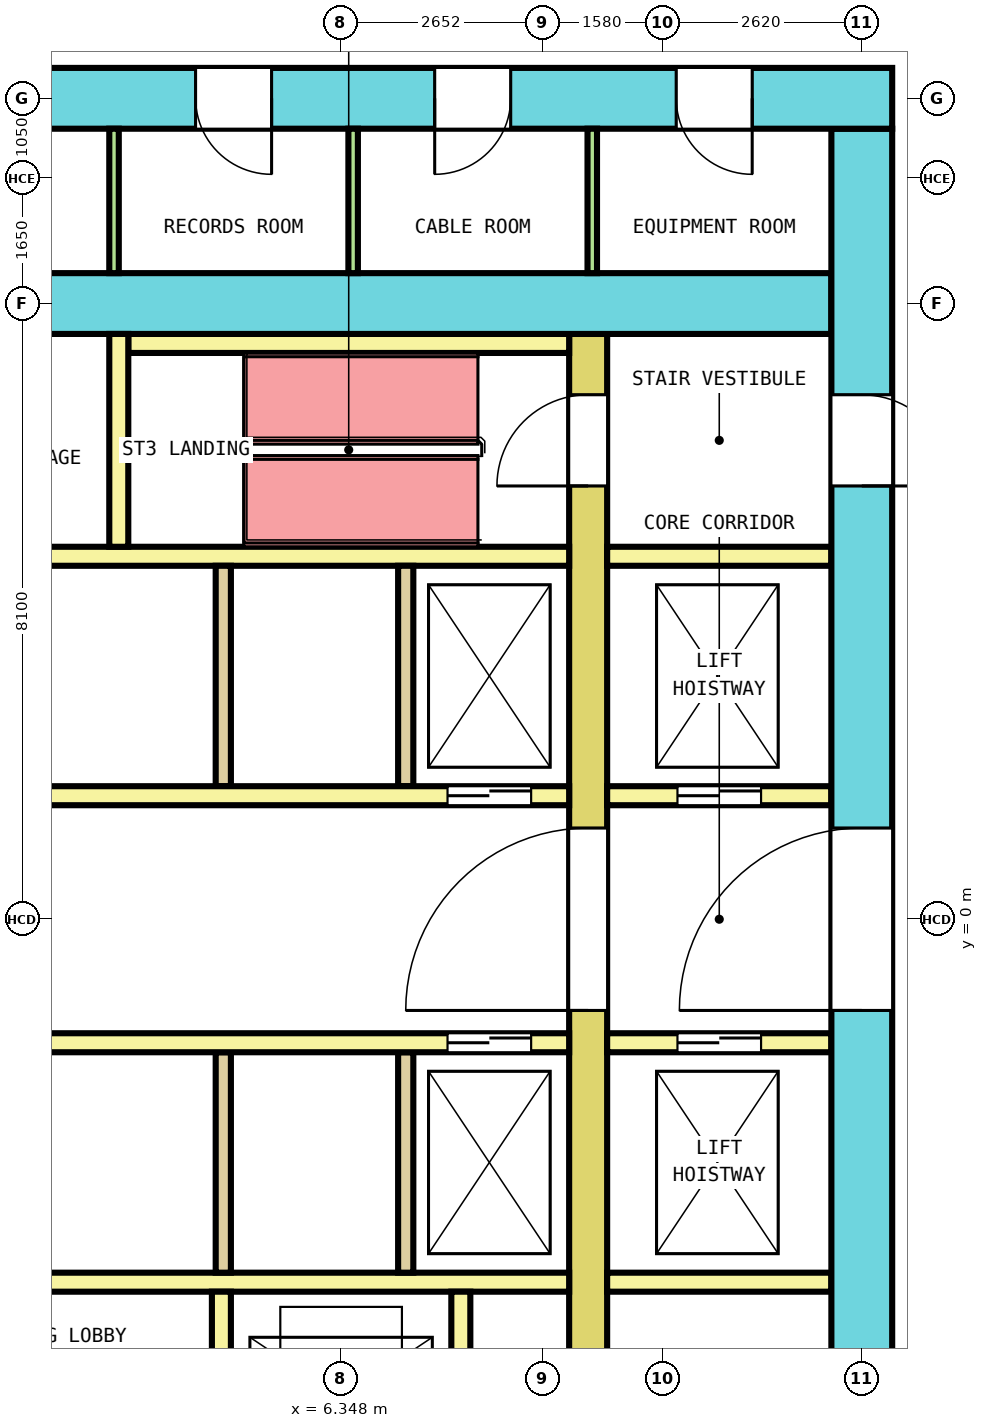
"""IFC4 building model, lengths in metres.
Left out: names, types, materials, properties, quantities, classifications, styles, units other than length and angle.
Written with IfcOpenShell. Run it as: python <this file> out.ifc"""

import sys

from ifc_helpers import new_model, si_unit, direction, frame, frame_2d, origin, place, context, subcontext, project, spatial, rectangle, extrude, element, fill, save


model = new_model("IFC4")
c1 = context("Model", 3, precision=1e-05, world=origin(), true_north=direction((0.0, 1.0)))
c2 = subcontext(c1, "Body", "Model", "MODEL_VIEW")
j1 = project(units=[si_unit("LENGTHUNIT", "METRE"), si_unit("PLANEANGLEUNIT", "RADIAN")], contexts=[c1])
p1 = place(None, origin())
s1 = spatial("IfcSite", under=j1, at=p1, CompositionType="ELEMENT")
p2 = place(p1, origin())
s2 = spatial("IfcBuilding", under=s1, at=p2, CompositionType="ELEMENT")
p3 = place(p2, frame((0.0, 0.0, 94.0)))
s3 = spatial("IfcBuildingStorey", under=s2, at=p3, CompositionType="ELEMENT", Elevation=94.0)
p4 = place(p3, frame((-13.6, 10.8, 0.0), z_axis=(0.0, 0.0, 1.0), x_axis=(1.0, 0.0, 0.0)))
e1 = element("IfcWall", 1, at=p4, inside=s3, PredefinedType="SHEAR", context=c2, shape_type="SweptSolid", body=[
    extrude(rectangle(XDim=27.2, YDim=0.8, at=frame_2d((13.6, 0.0))), origin(), (0.0, 0.0, 1.0), 4.1),
])
p5 = place(p4, frame((1.798, 0.0, 0.0)))
e2 = element("IfcOpeningElement", 2, at=p5, cuts=e1, PredefinedType="OPENING", context=c2, shape_type="SweptSolid", body=[
    extrude(rectangle(XDim=1.0, YDim=2.1, at=frame_2d((0.5, 1.05))), frame((0.0, 0.41, 0.0), z_axis=(0.0, -1.0, 0.0), x_axis=(1.0, 0.0, 0.0)), (0.0, 0.0, 1.0), 0.82),
])
p6 = place(p4, frame((4.889, 0.0, 0.0)))
e3 = element("IfcOpeningElement", 3, at=p6, cuts=e1, PredefinedType="OPENING", context=c2, shape_type="SweptSolid", body=[
    extrude(rectangle(XDim=1.0, YDim=2.1, at=frame_2d((0.5, 1.05))), frame((0.0, 0.41, 0.0), z_axis=(0.0, -1.0, 0.0), x_axis=(1.0, 0.0, 0.0)), (0.0, 0.0, 1.0), 0.82),
])
p7 = place(p4, frame((7.948, 0.0, 0.0)))
e4 = element("IfcOpeningElement", 4, at=p7, cuts=e1, PredefinedType="OPENING", context=c2, shape_type="SweptSolid", body=[
    extrude(rectangle(XDim=1.0, YDim=2.1, at=frame_2d((0.5, 1.05))), frame((0.0, 0.41, 0.0), z_axis=(0.0, -1.0, 0.0), x_axis=(1.0, 0.0, 0.0)), (0.0, 0.0, 1.0), 0.82),
])
p8 = place(p4, frame((11.008, 0.0, 0.0)))
e5 = element("IfcOpeningElement", 5, at=p8, cuts=e1, PredefinedType="OPENING", context=c2, shape_type="SweptSolid", body=[
    extrude(rectangle(XDim=1.0, YDim=2.1, at=frame_2d((0.5, 1.05))), frame((0.0, 0.41, 0.0), z_axis=(0.0, -1.0, 0.0), x_axis=(1.0, 0.0, 0.0)), (0.0, 0.0, 1.0), 0.82),
])
p9 = place(p4, frame((18.035, 0.0, 0.0)))
e6 = element("IfcOpeningElement", 6, at=p9, cuts=e1, PredefinedType="OPENING", context=c2, shape_type="SweptSolid", body=[
    extrude(rectangle(XDim=1.0, YDim=2.1, at=frame_2d((0.5, 1.05))), frame((0.0, 0.41, 0.0), z_axis=(0.0, -1.0, 0.0), x_axis=(1.0, 0.0, 0.0)), (0.0, 0.0, 1.0), 0.82),
])
p10 = place(p4, frame((21.181, 0.0, 0.0)))
e7 = element("IfcOpeningElement", 7, at=p10, cuts=e1, PredefinedType="OPENING", context=c2, shape_type="SweptSolid", body=[
    extrude(rectangle(XDim=1.0, YDim=2.1, at=frame_2d((0.5, 1.05))), frame((0.0, 0.41, 0.0), z_axis=(0.0, -1.0, 0.0), x_axis=(1.0, 0.0, 0.0)), (0.0, 0.0, 1.0), 0.82),
])
p11 = place(p4, frame((24.358, 0.0, 0.0)))
e8 = element("IfcOpeningElement", 8, at=p11, cuts=e1, PredefinedType="OPENING", context=c2, shape_type="SweptSolid", body=[
    extrude(rectangle(XDim=1.0, YDim=2.1, at=frame_2d((0.5, 1.05))), frame((0.0, 0.41, 0.0), z_axis=(0.0, -1.0, 0.0), x_axis=(1.0, 0.0, 0.0)), (0.0, 0.0, 1.0), 0.82),
])
p12 = place(p4, frame((14.525, 0.0, 0.0)))
e9 = element("IfcOpeningElement", 9, at=p12, cuts=e1, PredefinedType="OPENING", context=c2, shape_type="SweptSolid", body=[
    extrude(rectangle(XDim=1.4, YDim=2.1, at=frame_2d((0.7, 1.05))), frame((0.0, 0.41, 0.0), z_axis=(0.0, -1.0, 0.0), x_axis=(1.0, 0.0, 0.0)), (0.0, 0.0, 1.0), 0.82),
])
p13 = place(p3, frame((13.2, -10.4, 0.0), z_axis=(0.0, 0.0, 1.0), x_axis=(0.0, 1.0, 0.0)))
e10 = element("IfcWall", 10, at=p13, inside=s3, PredefinedType="SHEAR", context=c2, shape_type="SweptSolid", body=[
    extrude(rectangle(XDim=20.8, YDim=0.8, at=frame_2d((10.4, 0.0))), origin(), (0.0, 0.0, 1.0), 4.1),
])
p14 = place(p13, frame((9.2, 0.0, 0.0)))
e11 = element("IfcOpeningElement", 11, at=p14, cuts=e10, PredefinedType="OPENING", context=c2, shape_type="SweptSolid", body=[
    extrude(rectangle(XDim=2.4, YDim=2.1, at=frame_2d((1.2, 1.05))), frame((0.0, 0.41, 0.0), z_axis=(0.0, -1.0, 0.0), x_axis=(1.0, 0.0, 0.0)), (0.0, 0.0, 1.0), 0.82),
])
p15 = place(p13, frame((16.1, 0.0, 0.0)))
e12 = element("IfcOpeningElement", 12, at=p15, cuts=e10, PredefinedType="OPENING", context=c2, shape_type="SweptSolid", body=[
    extrude(rectangle(XDim=1.2, YDim=2.1, at=frame_2d((0.6, 1.05))), frame((0.0, 0.41, 0.0), z_axis=(0.0, -1.0, 0.0), x_axis=(1.0, 0.0, 0.0)), (0.0, 0.0, 1.0), 0.82),
])
p16 = place(p13, frame((3.6, 0.0, 0.0)))
e13 = element("IfcOpeningElement", 13, at=p16, cuts=e10, PredefinedType="OPENING", context=c2, shape_type="SweptSolid", body=[
    extrude(rectangle(XDim=1.0, YDim=2.1, at=frame_2d((0.5, 1.05))), frame((0.0, 0.41, 0.0), z_axis=(0.0, -1.0, 0.0), x_axis=(1.0, 0.0, 0.0)), (0.0, 0.0, 1.0), 0.82),
])
p17 = place(p3, frame((-12.8, 8.1, 0.0), z_axis=(0.0, 0.0, 1.0), x_axis=(1.0, 0.0, 0.0)))
e14 = element("IfcWall", 14, at=p17, inside=s3, PredefinedType="SHEAR", context=c2, shape_type="SweptSolid", body=[
    extrude(rectangle(XDim=25.6, YDim=0.8, at=frame_2d((12.8, 0.0))), origin(), (0.0, 0.0, 1.0), 4.1),
])
p18 = place(p17, frame((13.725, 0.0, 0.0)))
e15 = element("IfcOpeningElement", 15, at=p18, cuts=e14, PredefinedType="OPENING", context=c2, shape_type="SweptSolid", body=[
    extrude(rectangle(XDim=1.4, YDim=2.1, at=frame_2d((0.7, 1.05))), frame((0.0, 0.41, 0.0), z_axis=(0.0, -1.0, 0.0), x_axis=(1.0, 0.0, 0.0)), (0.0, 0.0, 1.0), 0.82),
])
p19 = place(p3, frame((9.6, -7.7, 0.0), z_axis=(0.0, 0.0, 1.0), x_axis=(0.0, 1.0, 0.0)))
e16 = element("IfcWall", 16, at=p19, inside=s3, PredefinedType="SHEAR", context=c2, shape_type="SweptSolid", body=[
    extrude(rectangle(XDim=15.4, YDim=0.5, at=frame_2d((7.7, 0.0))), origin(), (0.0, 0.0, 1.0), 4.1),
])
p20 = place(p19, frame((6.5, 0.0, 0.0)))
e17 = element("IfcOpeningElement", 17, at=p20, cuts=e16, PredefinedType="OPENING", context=c2, shape_type="SweptSolid", body=[
    extrude(rectangle(XDim=2.4, YDim=2.1, at=frame_2d((1.2, 1.05))), frame((0.0, 0.26, 0.0), z_axis=(0.0, -1.0, 0.0), x_axis=(1.0, 0.0, 0.0)), (0.0, 0.0, 1.0), 0.52),
])
p21 = place(p19, frame((13.4, 0.0, 0.0)))
e18 = element("IfcOpeningElement", 18, at=p21, cuts=e16, PredefinedType="OPENING", context=c2, shape_type="SweptSolid", body=[
    extrude(rectangle(XDim=1.2, YDim=2.1, at=frame_2d((0.6, 1.05))), frame((0.0, 0.26, 0.0), z_axis=(0.0, -1.0, 0.0), x_axis=(1.0, 0.0, 0.0)), (0.0, 0.0, 1.0), 0.52),
])
p22 = place(p19, frame((0.9, 0.0, 0.0)))
e19 = element("IfcOpeningElement", 19, at=p22, cuts=e16, PredefinedType="OPENING", context=c2, shape_type="SweptSolid", body=[
    extrude(rectangle(XDim=1.0, YDim=2.1, at=frame_2d((0.5, 1.05))), frame((0.0, 0.26, 0.0), z_axis=(0.0, -1.0, 0.0), x_axis=(1.0, 0.0, 0.0)), (0.0, 0.0, 1.0), 0.52),
])
p23 = place(p3, frame((-9.35, 1.625, 0.0), z_axis=(0.0, 0.0, 1.0), x_axis=(1.0, 0.0, 0.0)))
e20 = element("IfcWall", 20, at=p23, inside=s3, PredefinedType="SOLIDWALL", context=c2, shape_type="SweptSolid", body=[
    extrude(rectangle(XDim=18.7, YDim=0.25, at=frame_2d((9.35, 0.0))), origin(), (0.0, 0.0, 1.0), 4.1),
])
p24 = place(p23, frame((0.5, 0.0, 0.0)))
e21 = element("IfcOpeningElement", 21, at=p24, cuts=e20, PredefinedType="OPENING", context=c2, shape_type="SweptSolid", body=[
    extrude(rectangle(XDim=1.1, YDim=2.1, at=frame_2d((0.55, 1.05))), frame((0.0, 0.135, 0.0), z_axis=(0.0, -1.0, 0.0), x_axis=(1.0, 0.0, 0.0)), (0.0, 0.0, 1.0), 0.27),
])
p25 = place(p23, frame((17.1, 0.0, 0.0)))
e22 = element("IfcOpeningElement", 22, at=p25, cuts=e20, PredefinedType="OPENING", context=c2, shape_type="SweptSolid", body=[
    extrude(rectangle(XDim=1.1, YDim=2.1, at=frame_2d((0.55, 1.05))), frame((0.0, 0.135, 0.0), z_axis=(0.0, -1.0, 0.0), x_axis=(1.0, 0.0, 0.0)), (0.0, 0.0, 1.0), 0.27),
])
p26 = place(p3, frame((9.85, 1.625, 0.0), z_axis=(0.0, 0.0, 1.0), x_axis=(1.0, 0.0, 0.0)))
e23 = element("IfcWall", 23, at=p26, inside=s3, PredefinedType="SOLIDWALL", context=c2, shape_type="SweptSolid", body=[
    extrude(rectangle(XDim=2.95, YDim=0.25, at=frame_2d((1.475, 0.0))), origin(), (0.0, 0.0, 1.0), 4.1),
])
p27 = place(p26, frame((0.925, 0.0, 0.0)))
e24 = element("IfcOpeningElement", 24, at=p27, cuts=e23, PredefinedType="OPENING", context=c2, shape_type="SweptSolid", body=[
    extrude(rectangle(XDim=1.1, YDim=2.1, at=frame_2d((0.55, 1.05))), frame((0.0, 0.135, 0.0), z_axis=(0.0, -1.0, 0.0), x_axis=(1.0, 0.0, 0.0)), (0.0, 0.0, 1.0), 0.27),
])
p28 = place(p3, frame((-9.35, 4.775, 0.0), z_axis=(0.0, 0.0, 1.0), x_axis=(1.0, 0.0, 0.0)))
e25 = element("IfcWall", 25, at=p28, inside=s3, PredefinedType="SOLIDWALL", context=c2, shape_type="SweptSolid", body=[
    extrude(rectangle(XDim=18.7, YDim=0.25, at=frame_2d((9.35, 0.0))), origin(), (0.0, 0.0, 1.0), 4.1),
])
p29 = place(p3, frame((9.85, 4.775, 0.0), z_axis=(0.0, 0.0, 1.0), x_axis=(1.0, 0.0, 0.0)))
e26 = element("IfcWall", 26, at=p29, inside=s3, PredefinedType="SOLIDWALL", context=c2, shape_type="SweptSolid", body=[
    extrude(rectangle(XDim=2.95, YDim=0.25, at=frame_2d((1.475, 0.0))), origin(), (0.0, 0.0, 1.0), 4.1),
])
for number, where, z_axis, x_axis in (
    (27, (4.8, 1.75, 0.0), (0.0, 0.0, 1.0), (0.0, 1.0, 0.0)),
    (28, (7.2, 1.75, 0.0), (0.0, 0.0, 1.0), (0.0, 1.0, 0.0)),
):
    element("IfcWall", number, at=place(p3, frame(where, z_axis=z_axis, x_axis=x_axis)), inside=s3, PredefinedType="SOLIDWALL", context=c2, shape_type="SweptSolid", body=[
        extrude(rectangle(XDim=2.9, YDim=0.2, at=frame_2d((1.45, 0.0))), origin(), (0.0, 0.0, 1.0), 4.1),
    ])
p30 = place(p3, frame((-9.35, -1.625, 0.0), z_axis=(0.0, 0.0, 1.0), x_axis=(1.0, 0.0, 0.0)))
e29 = element("IfcWall", 29, at=p30, inside=s3, PredefinedType="SOLIDWALL", context=c2, shape_type="SweptSolid", body=[
    extrude(rectangle(XDim=18.7, YDim=0.25, at=frame_2d((9.35, 0.0))), origin(), (0.0, 0.0, 1.0), 4.1),
])
p31 = place(p30, frame((0.5, 0.0, 0.0)))
e30 = element("IfcOpeningElement", 30, at=p31, cuts=e29, PredefinedType="OPENING", context=c2, shape_type="SweptSolid", body=[
    extrude(rectangle(XDim=1.1, YDim=2.1, at=frame_2d((0.55, 1.05))), frame((0.0, 0.135, 0.0), z_axis=(0.0, -1.0, 0.0), x_axis=(1.0, 0.0, 0.0)), (0.0, 0.0, 1.0), 0.27),
])
p32 = place(p30, frame((17.1, 0.0, 0.0)))
e31 = element("IfcOpeningElement", 31, at=p32, cuts=e29, PredefinedType="OPENING", context=c2, shape_type="SweptSolid", body=[
    extrude(rectangle(XDim=1.1, YDim=2.1, at=frame_2d((0.55, 1.05))), frame((0.0, 0.135, 0.0), z_axis=(0.0, -1.0, 0.0), x_axis=(1.0, 0.0, 0.0)), (0.0, 0.0, 1.0), 0.27),
])
p33 = place(p3, frame((9.85, -1.625, 0.0), z_axis=(0.0, 0.0, 1.0), x_axis=(1.0, 0.0, 0.0)))
e32 = element("IfcWall", 32, at=p33, inside=s3, PredefinedType="SOLIDWALL", context=c2, shape_type="SweptSolid", body=[
    extrude(rectangle(XDim=2.95, YDim=0.25, at=frame_2d((1.475, 0.0))), origin(), (0.0, 0.0, 1.0), 4.1),
])
p34 = place(p33, frame((0.925, 0.0, 0.0)))
e33 = element("IfcOpeningElement", 33, at=p34, cuts=e32, PredefinedType="OPENING", context=c2, shape_type="SweptSolid", body=[
    extrude(rectangle(XDim=1.1, YDim=2.1, at=frame_2d((0.55, 1.05))), frame((0.0, 0.135, 0.0), z_axis=(0.0, -1.0, 0.0), x_axis=(1.0, 0.0, 0.0)), (0.0, 0.0, 1.0), 0.27),
])
p35 = place(p3, frame((-9.35, -4.775, 0.0), z_axis=(0.0, 0.0, 1.0), x_axis=(1.0, 0.0, 0.0)))
e34 = element("IfcWall", 34, at=p35, inside=s3, PredefinedType="SOLIDWALL", context=c2, shape_type="SweptSolid", body=[
    extrude(rectangle(XDim=18.7, YDim=0.25, at=frame_2d((9.35, 0.0))), origin(), (0.0, 0.0, 1.0), 4.1),
])
p36 = place(p3, frame((9.85, -4.775, 0.0), z_axis=(0.0, 0.0, 1.0), x_axis=(1.0, 0.0, 0.0)))
e35 = element("IfcWall", 35, at=p36, inside=s3, PredefinedType="SOLIDWALL", context=c2, shape_type="SweptSolid", body=[
    extrude(rectangle(XDim=2.95, YDim=0.25, at=frame_2d((1.475, 0.0))), origin(), (0.0, 0.0, 1.0), 4.1),
])
for number, where, z_axis, x_axis in (
    (36, (4.8, -4.65, 0.0), (0.0, 0.0, 1.0), (0.0, 1.0, 0.0)),
    (37, (7.2, -4.65, 0.0), (0.0, 0.0, 1.0), (0.0, 1.0, 0.0)),
):
    element("IfcWall", number, at=place(p3, frame(where, z_axis=z_axis, x_axis=x_axis)), inside=s3, PredefinedType="SOLIDWALL", context=c2, shape_type="SweptSolid", body=[
        extrude(rectangle(XDim=2.9, YDim=0.2, at=frame_2d((1.45, 0.0))), origin(), (0.0, 0.0, 1.0), 4.1),
    ])
p37 = place(p3, frame((3.55, 7.575, 0.0), z_axis=(0.0, 0.0, 1.0), x_axis=(1.0, 0.0, 0.0)))
e38 = element("IfcWall", 38, at=p37, inside=s3, PredefinedType="SOLIDWALL", context=c2, shape_type="SweptSolid", body=[
    extrude(rectangle(XDim=5.8, YDim=0.25, at=frame_2d((2.9, 0.0))), origin(), (0.0, 0.0, 1.0), 4.1),
])
p38 = place(p3, frame((3.425, 4.9, 0.0), z_axis=(0.0, 0.0, 1.0), x_axis=(0.0, 1.0, 0.0)))
e39 = element("IfcWall", 39, at=p38, inside=s3, PredefinedType="SOLIDWALL", context=c2, shape_type="SweptSolid", body=[
    extrude(rectangle(XDim=2.8, YDim=0.25, at=frame_2d((1.4, 0.0))), origin(), (0.0, 0.0, 1.0), 4.1),
])
p39 = place(p3, frame((4.775, -7.7, 0.0), z_axis=(0.0, 0.0, 1.0), x_axis=(0.0, 1.0, 0.0)))
e40 = element("IfcWall", 40, at=p39, inside=s3, PredefinedType="SOLIDWALL", context=c2, shape_type="SweptSolid", body=[
    extrude(rectangle(XDim=2.8, YDim=0.25, at=frame_2d((1.4, 0.0))), origin(), (0.0, 0.0, 1.0), 4.1),
])
p40 = place(p39, frame((0.85, 0.0, 0.0)))
e41 = element("IfcOpeningElement", 41, at=p40, cuts=e40, PredefinedType="OPENING", context=c2, shape_type="SweptSolid", body=[
    extrude(rectangle(XDim=1.1, YDim=2.1, at=frame_2d((0.55, 1.05))), frame((0.0, 0.135, 0.0), z_axis=(0.0, -1.0, 0.0), x_axis=(1.0, 0.0, 0.0)), (0.0, 0.0, 1.0), 0.27),
])
p41 = place(p3, frame((7.925, -7.7, 0.0), z_axis=(0.0, 0.0, 1.0), x_axis=(0.0, 1.0, 0.0)))
e42 = element("IfcWall", 42, at=p41, inside=s3, PredefinedType="SOLIDWALL", context=c2, shape_type="SweptSolid", body=[
    extrude(rectangle(XDim=2.8, YDim=0.25, at=frame_2d((1.4, 0.0))), origin(), (0.0, 0.0, 1.0), 4.1),
])
for number, where, z_axis, x_axis in (
    (43, (3.363, 8.5, 0.0), (0.0, 0.0, 1.0), (0.0, 1.0, 0.0)),
    (44, (6.508, 8.5, 0.0), (0.0, 0.0, 1.0), (0.0, 1.0, 0.0)),
    (45, (9.654, 8.5, 0.0), (0.0, 0.0, 1.0), (0.0, 1.0, 0.0)),
):
    element("IfcWall", number, at=place(p3, frame(where, z_axis=z_axis, x_axis=x_axis)), inside=s3, PredefinedType="PARTITIONING", context=c2, shape_type="SweptSolid", body=[
        extrude(rectangle(XDim=1.9, YDim=0.125, at=frame_2d((0.95, 0.0))), origin(), (0.0, 0.0, 1.0), 4.1),
    ])
p42 = place(p25, origin())
e46 = element("IfcDoor", 46, at=p42, inside=s3, OperationType="DOUBLE_DOOR_SLIDING", PredefinedType="DOOR", context=c2, shape_type="SweptSolid", body=[
    extrude(rectangle(XDim=1.1, YDim=2.1, at=frame_2d((0.55, 1.05))), frame((0.0, 0.075, 0.0), z_axis=(0.0, -1.0, 0.0), x_axis=(1.0, 0.0, 0.0)), (0.0, 0.0, 1.0), 0.15),
])
fill(e22, e46)
p43 = place(p27, origin())
e47 = element("IfcDoor", 47, at=p43, inside=s3, OperationType="DOUBLE_DOOR_SLIDING", PredefinedType="DOOR", context=c2, shape_type="SweptSolid", body=[
    extrude(rectangle(XDim=1.1, YDim=2.1, at=frame_2d((0.55, 1.05))), frame((0.0, 0.075, 0.0), z_axis=(0.0, -1.0, 0.0), x_axis=(1.0, 0.0, 0.0)), (0.0, 0.0, 1.0), 0.15),
])
fill(e24, e47)
p44 = place(p32, origin())
e48 = element("IfcDoor", 48, at=p44, inside=s3, OperationType="DOUBLE_DOOR_SLIDING", PredefinedType="DOOR", context=c2, shape_type="SweptSolid", body=[
    extrude(rectangle(XDim=1.1, YDim=2.1, at=frame_2d((0.55, 1.05))), frame((0.0, 0.075, 0.0), z_axis=(0.0, -1.0, 0.0), x_axis=(1.0, 0.0, 0.0)), (0.0, 0.0, 1.0), 0.15),
])
fill(e31, e48)
p45 = place(p34, origin())
e49 = element("IfcDoor", 49, at=p45, inside=s3, OperationType="DOUBLE_DOOR_SLIDING", PredefinedType="DOOR", context=c2, shape_type="SweptSolid", body=[
    extrude(rectangle(XDim=1.1, YDim=2.1, at=frame_2d((0.55, 1.05))), frame((0.0, 0.075, 0.0), z_axis=(0.0, -1.0, 0.0), x_axis=(1.0, 0.0, 0.0)), (0.0, 0.0, 1.0), 0.15),
])
fill(e33, e49)
p46 = place(p20, origin())
e50 = element("IfcDoor", 50, at=p46, inside=s3, OperationType="DOUBLE_DOOR_SINGLE_SWING", PredefinedType="DOOR", context=c2, shape_type="SweptSolid", body=[
    extrude(rectangle(XDim=2.4, YDim=2.1, at=frame_2d((1.2, 1.05))), frame((0.0, 0.2, 0.0), z_axis=(0.0, -1.0, 0.0), x_axis=(1.0, 0.0, 0.0)), (0.0, 0.0, 1.0), 0.4),
])
fill(e17, e50)
p47 = place(p14, origin())
e51 = element("IfcDoor", 51, at=p47, inside=s3, OperationType="DOUBLE_DOOR_SINGLE_SWING", PredefinedType="DOOR", context=c2, shape_type="SweptSolid", body=[
    extrude(rectangle(XDim=2.4, YDim=2.1, at=frame_2d((1.2, 1.05))), frame((0.0, 0.3, 0.0), z_axis=(0.0, -1.0, 0.0), x_axis=(1.0, 0.0, 0.0)), (0.0, 0.0, 1.0), 0.6),
])
fill(e11, e51)
p48 = place(p21, origin())
e52 = element("IfcDoor", 52, at=p48, inside=s3, OperationType="SINGLE_SWING_LEFT", PredefinedType="DOOR", context=c2, shape_type="SweptSolid", body=[
    extrude(rectangle(XDim=1.2, YDim=2.1, at=frame_2d((0.6, 1.05))), frame((0.0, 0.2, 0.0), z_axis=(0.0, -1.0, 0.0), x_axis=(1.0, 0.0, 0.0)), (0.0, 0.0, 1.0), 0.4),
])
fill(e18, e52)
p49 = place(p15, origin())
e53 = element("IfcDoor", 53, at=p49, inside=s3, OperationType="SINGLE_SWING_RIGHT", PredefinedType="DOOR", context=c2, shape_type="SweptSolid", body=[
    extrude(rectangle(XDim=1.2, YDim=2.1, at=frame_2d((0.6, 1.05))), frame((0.0, 0.3, 0.0), z_axis=(0.0, -1.0, 0.0), x_axis=(1.0, 0.0, 0.0)), (0.0, 0.0, 1.0), 0.6),
])
fill(e12, e53)
p50 = place(p9, origin())
e54 = element("IfcDoor", 54, at=p50, inside=s3, OperationType="SINGLE_SWING_LEFT", PredefinedType="DOOR", context=c2, shape_type="SweptSolid", body=[
    extrude(rectangle(XDim=1.0, YDim=2.1, at=frame_2d((0.5, 1.05))), frame((0.0, 0.3, 0.0), z_axis=(0.0, -1.0, 0.0), x_axis=(1.0, 0.0, 0.0)), (0.0, 0.0, 1.0), 0.6),
])
fill(e6, e54)
p51 = place(p10, origin())
e55 = element("IfcDoor", 55, at=p51, inside=s3, OperationType="SINGLE_SWING_RIGHT", PredefinedType="DOOR", context=c2, shape_type="SweptSolid", body=[
    extrude(rectangle(XDim=1.0, YDim=2.1, at=frame_2d((0.5, 1.05))), frame((0.0, 0.3, 0.0), z_axis=(0.0, -1.0, 0.0), x_axis=(1.0, 0.0, 0.0)), (0.0, 0.0, 1.0), 0.6),
])
fill(e7, e55)
p52 = place(p11, origin())
e56 = element("IfcDoor", 56, at=p52, inside=s3, OperationType="SINGLE_SWING_LEFT", PredefinedType="DOOR", context=c2, shape_type="SweptSolid", body=[
    extrude(rectangle(XDim=1.0, YDim=2.1, at=frame_2d((0.5, 1.05))), frame((0.0, 0.3, 0.0), z_axis=(0.0, -1.0, 0.0), x_axis=(1.0, 0.0, 0.0)), (0.0, 0.0, 1.0), 0.6),
])
fill(e8, e56)
save(model, sys.argv[1])
